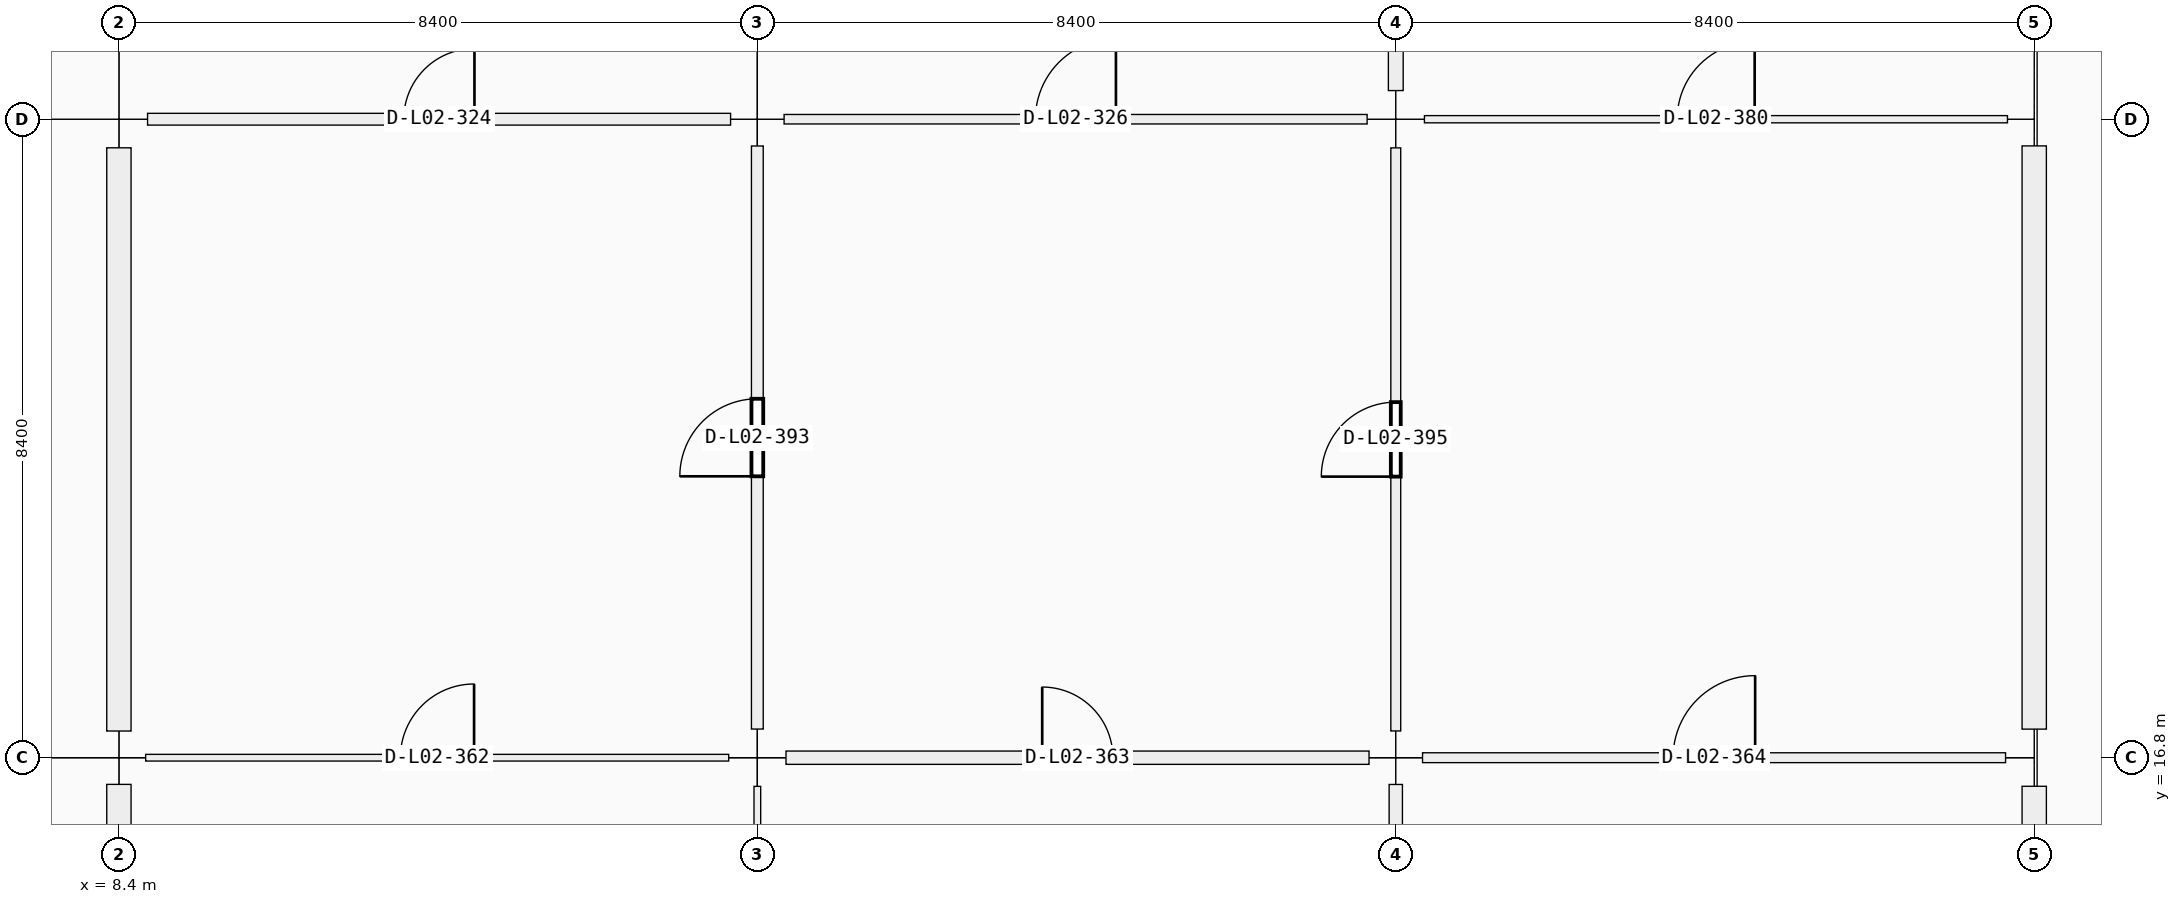
"""IFC4 building model, lengths in metres.
Left out: names, types, materials, properties, quantities, classifications, styles, units other than length and angle.
Written with IfcOpenShell. Run it as: python <this file> out.ifc"""

import sys

from ifc_helpers import new_model, si_unit, direction, frame, frame_2d, origin, origin_2d, place, context, subcontext, project, spatial, rectangle, extrude, element, fill, save


model = new_model("IFC4")
c1 = context("Model", 3, precision=1e-05, world=origin(), true_north=direction((0.0, 1.0)))
c2 = subcontext(c1, "Body", "Model", "MODEL_VIEW")
j1 = project(units=[si_unit("LENGTHUNIT", "METRE"), si_unit("PLANEANGLEUNIT", "RADIAN")], contexts=[c1])
p1 = place(None, origin())
s1 = spatial("IfcSite", under=j1, at=p1, CompositionType="ELEMENT")
p2 = place(p1, origin())
s2 = spatial("IfcBuilding", under=s1, at=p2, CompositionType="ELEMENT")
p3 = place(p2, frame((0.0, 0.0, 10.26)))
s3 = spatial("IfcBuildingStorey", under=s2, at=p3, CompositionType="ELEMENT", Elevation=10.26)
p4 = place(p3, frame((8.4, 16.8, 0.0), z_axis=(0.0, 0.0, 1.0), x_axis=(1.0, 0.0, 0.0)))
e1 = element("IfcColumn", 1, at=p4, inside=s3, PredefinedType="COLUMN", context=c2, shape_type="SweptSolid", body=[
    extrude(rectangle(XDim=0.7, YDim=0.7, at=origin_2d()), origin(), (0.0, 0.0, 1.0), 4.5),
])
for number, where, z_axis, x_axis in (
    (2, (8.4, 25.2, 0.0), (0.0, 0.0, 1.0), (1.0, 0.0, 0.0)),
    (3, (16.8, 16.8, 0.0), (0.0, 0.0, 1.0), (1.0, 0.0, 0.0)),
):
    element("IfcColumn", number, at=place(p3, frame(where, z_axis=z_axis, x_axis=x_axis)), inside=s3, PredefinedType="COLUMN", context=c2, shape_type="SweptSolid", body=[
        extrude(rectangle(XDim=0.75, YDim=0.75, at=origin_2d()), origin(), (0.0, 0.0, 1.0), 4.5),
    ])
for number, where, z_axis, x_axis in (
    (4, (16.8, 25.2, 0.0), (0.0, 0.0, 1.0), (1.0, 0.0, 0.0)),
    (5, (25.2, 16.8, 0.0), (0.0, 0.0, 1.0), (1.0, 0.0, 0.0)),
):
    element("IfcColumn", number, at=place(p3, frame(where, z_axis=z_axis, x_axis=x_axis)), inside=s3, PredefinedType="COLUMN", context=c2, shape_type="SweptSolid", body=[
        extrude(rectangle(XDim=0.7, YDim=0.7, at=origin_2d()), origin(), (0.0, 0.0, 1.0), 4.5),
    ])
for number, where, z_axis, x_axis in (
    (6, (25.2, 25.2, 0.0), (0.0, 0.0, 1.0), (1.0, 0.0, 0.0)),
    (7, (33.6, 16.8, 0.0), (0.0, 0.0, 1.0), (1.0, 0.0, 0.0)),
):
    element("IfcColumn", number, at=place(p3, frame(where, z_axis=z_axis, x_axis=x_axis)), inside=s3, PredefinedType="COLUMN", context=c2, shape_type="SweptSolid", body=[
        extrude(rectangle(XDim=0.75, YDim=0.75, at=origin_2d()), origin(), (0.0, 0.0, 1.0), 4.5),
    ])
p5 = place(p3, frame((33.6, 25.2, 0.0), z_axis=(0.0, 0.0, 1.0), x_axis=(1.0, 0.0, 0.0)))
e8 = element("IfcColumn", 8, at=p5, inside=s3, PredefinedType="COLUMN", context=c2, shape_type="SweptSolid", body=[
    extrude(rectangle(XDim=0.7, YDim=0.7, at=origin_2d()), origin(), (0.0, 0.0, 1.0), 4.5),
])
p6 = place(p3, frame((8.4, 8.676, 0.0), z_axis=(0.0, 0.0, 1.0), x_axis=(0.0, 1.0, 0.0)))
e9 = element("IfcWall", 9, at=p6, inside=s3, PredefinedType="SOLIDWALL", context=c2, shape_type="SweptSolid", body=[
    extrude(rectangle(XDim=7.773, YDim=0.32, at=frame_2d((3.886, 0.0))), origin(), (0.0, 0.0, 1.0), 3.54),
])
p7 = place(p6, frame((2.861, 0.0, 0.9)))
e10 = element("IfcOpeningElement", 10, at=p7, cuts=e9, PredefinedType="OPENING", context=c2, shape_type="SweptSolid", body=[
    extrude(rectangle(XDim=2.05, YDim=1.45, at=frame_2d((1.025, 0.725))), frame((0.0, 0.16, 0.0), z_axis=(0.0, -1.0, 0.0), x_axis=(1.0, 0.0, 0.0)), (0.0, 0.0, 1.0), 0.32),
])
p8 = place(p3, frame((8.4, 17.151, 0.0), z_axis=(0.0, 0.0, 1.0), x_axis=(0.0, 1.0, 0.0)))
e11 = element("IfcWall", 11, at=p8, inside=s3, PredefinedType="SOLIDWALL", context=c2, shape_type="SweptSolid", body=[
    extrude(rectangle(XDim=7.673, YDim=0.32, at=frame_2d((3.836, 0.0))), origin(), (0.0, 0.0, 1.0), 3.54),
])
p9 = place(p8, frame((2.611, 0.0, 0.9)))
e12 = element("IfcOpeningElement", 12, at=p9, cuts=e11, PredefinedType="OPENING", context=c2, shape_type="SweptSolid", body=[
    extrude(rectangle(XDim=2.45, YDim=1.45, at=frame_2d((1.225, 0.725))), frame((0.0, 0.16, 0.0), z_axis=(0.0, -1.0, 0.0), x_axis=(1.0, 0.0, 0.0)), (0.0, 0.0, 1.0), 0.32),
])
p10 = place(p3, frame((33.6, 16.424, 0.0), z_axis=(0.0, 0.0, 1.0), x_axis=(0.0, -1.0, 0.0)))
e13 = element("IfcWall", 13, at=p10, inside=s3, PredefinedType="SOLIDWALL", context=c2, shape_type="SweptSolid", body=[
    extrude(rectangle(XDim=7.748, YDim=0.32, at=frame_2d((3.874, 0.0))), origin(), (0.0, 0.0, 1.0), 3.54),
])
p11 = place(p10, frame((3.074, 0.0, 0.9)))
e14 = element("IfcOpeningElement", 14, at=p11, cuts=e13, PredefinedType="OPENING", context=c2, shape_type="SweptSolid", body=[
    extrude(rectangle(XDim=1.6, YDim=2.1, at=frame_2d((0.8, 1.05))), frame((0.0, 0.16, 0.0), z_axis=(0.0, -1.0, 0.0), x_axis=(1.0, 0.0, 0.0)), (0.0, 0.0, 1.0), 0.32),
])
p12 = place(p3, frame((33.6, 24.849, 0.0), z_axis=(0.0, 0.0, 1.0), x_axis=(0.0, -1.0, 0.0)))
e15 = element("IfcWall", 15, at=p12, inside=s3, PredefinedType="SOLIDWALL", context=c2, shape_type="SweptSolid", body=[
    extrude(rectangle(XDim=7.673, YDim=0.32, at=frame_2d((3.836, 0.0))), origin(), (0.0, 0.0, 1.0), 3.54),
])
p13 = place(p12, frame((2.837, 0.0, 0.9)))
e16 = element("IfcOpeningElement", 16, at=p13, cuts=e15, PredefinedType="OPENING", context=c2, shape_type="SweptSolid", body=[
    extrude(rectangle(XDim=2.0, YDim=2.1, at=frame_2d((1.0, 1.05))), frame((0.0, 0.16, 0.0), z_axis=(0.0, -1.0, 0.0), x_axis=(1.0, 0.0, 0.0)), (0.0, 0.0, 1.0), 0.32),
])
p14 = place(p3, frame((8.752, 16.8, 0.0), z_axis=(0.0, 0.0, 1.0), x_axis=(1.0, 0.0, 0.0)))
e17 = element("IfcWall", 17, at=p14, inside=s3, PredefinedType="PARTITIONING", context=c2, shape_type="SweptSolid", body=[
    extrude(rectangle(XDim=7.671, YDim=0.088, at=frame_2d((3.835, 0.0))), origin(), (0.0, 0.0, 1.0), 3.37),
])
p15 = place(p14, frame((3.351, 0.0, 0.0)))
e18 = element("IfcOpeningElement", 18, at=p15, cuts=e17, PredefinedType="OPENING", context=c2, shape_type="SweptSolid", body=[
    extrude(rectangle(XDim=0.97, YDim=2.12, at=frame_2d((0.485, 1.06))), frame((0.0, 0.044, 0.0), z_axis=(0.0, -1.0, 0.0), x_axis=(1.0, 0.0, 0.0)), (0.0, 0.0, 1.0), 0.088),
])
p16 = place(p3, frame((8.777, 25.2, 0.0), z_axis=(0.0, 0.0, 1.0), x_axis=(1.0, 0.0, 0.0)))
e19 = element("IfcWall", 19, at=p16, inside=s3, PredefinedType="PARTITIONING", context=c2, shape_type="SweptSolid", body=[
    extrude(rectangle(XDim=7.671, YDim=0.155, at=frame_2d((3.835, 0.0))), origin(), (0.0, 0.0, 1.0), 3.37),
])
p17 = place(p16, frame((3.371, 0.0, 0.0)))
e20 = element("IfcOpeningElement", 20, at=p17, cuts=e19, PredefinedType="OPENING", context=c2, shape_type="SweptSolid", body=[
    extrude(rectangle(XDim=0.93, YDim=2.12, at=frame_2d((0.465, 1.06))), frame((0.0, 0.078, 0.0), z_axis=(0.0, -1.0, 0.0), x_axis=(1.0, 0.0, 0.0)), (0.0, 0.0, 1.0), 0.155),
])
p18 = place(p3, frame((17.177, 16.8, 0.0), z_axis=(0.0, 0.0, 1.0), x_axis=(1.0, 0.0, 0.0)))
e21 = element("IfcWall", 21, at=p18, inside=s3, PredefinedType="PARTITIONING", context=c2, shape_type="SweptSolid", body=[
    extrude(rectangle(XDim=7.671, YDim=0.175, at=frame_2d((3.835, 0.0))), origin(), (0.0, 0.0, 1.0), 3.37),
])
p19 = place(p18, frame((3.371, 0.0, 0.0)))
e22 = element("IfcOpeningElement", 22, at=p19, cuts=e21, PredefinedType="OPENING", context=c2, shape_type="SweptSolid", body=[
    extrude(rectangle(XDim=0.93, YDim=2.12, at=frame_2d((0.465, 1.06))), frame((0.0, 0.087, 0.0), z_axis=(0.0, -1.0, 0.0), x_axis=(1.0, 0.0, 0.0)), (0.0, 0.0, 1.0), 0.175),
])
p20 = place(p3, frame((17.152, 25.2, 0.0), z_axis=(0.0, 0.0, 1.0), x_axis=(1.0, 0.0, 0.0)))
e23 = element("IfcWall", 23, at=p20, inside=s3, PredefinedType="PARTITIONING", context=c2, shape_type="SweptSolid", body=[
    extrude(rectangle(XDim=7.671, YDim=0.125, at=frame_2d((3.835, 0.0))), origin(), (0.0, 0.0, 1.0), 3.37),
])
p21 = place(p20, frame((3.306, 0.0, 0.0)))
e24 = element("IfcOpeningElement", 24, at=p21, cuts=e23, PredefinedType="OPENING", context=c2, shape_type="SweptSolid", body=[
    extrude(rectangle(XDim=1.06, YDim=2.25, at=frame_2d((0.53, 1.125))), frame((0.0, 0.062, 0.0), z_axis=(0.0, -1.0, 0.0), x_axis=(1.0, 0.0, 0.0)), (0.0, 0.0, 1.0), 0.125),
])
p22 = place(p3, frame((25.552, 16.8, 0.0), z_axis=(0.0, 0.0, 1.0), x_axis=(1.0, 0.0, 0.0)))
e25 = element("IfcWall", 25, at=p22, inside=s3, PredefinedType="MOVABLE", context=c2, shape_type="SweptSolid", body=[
    extrude(rectangle(XDim=7.671, YDim=0.13, at=frame_2d((3.835, 0.0))), origin(), (0.0, 0.0, 1.0), 3.37),
])
p23 = place(p22, frame((3.296, 0.0, 0.0)))
e26 = element("IfcOpeningElement", 26, at=p23, cuts=e25, PredefinedType="OPENING", context=c2, shape_type="SweptSolid", body=[
    extrude(rectangle(XDim=1.08, YDim=2.25, at=frame_2d((0.54, 1.125))), frame((0.0, 0.065, 0.0), z_axis=(0.0, -1.0, 0.0), x_axis=(1.0, 0.0, 0.0)), (0.0, 0.0, 1.0), 0.13),
])
p24 = place(p3, frame((25.577, 25.2, 0.0), z_axis=(0.0, 0.0, 1.0), x_axis=(1.0, 0.0, 0.0)))
e27 = element("IfcWall", 27, at=p24, inside=s3, PredefinedType="PARTITIONING", context=c2, shape_type="SweptSolid", body=[
    extrude(rectangle(XDim=7.671, YDim=0.095, at=frame_2d((3.835, 0.0))), origin(), (0.0, 0.0, 1.0), 3.37),
])
p25 = place(p24, frame((3.325, 0.0, 0.0)))
e28 = element("IfcOpeningElement", 28, at=p25, cuts=e27, PredefinedType="OPENING", context=c2, shape_type="SweptSolid", body=[
    extrude(rectangle(XDim=1.02, YDim=2.2, at=frame_2d((0.51, 1.1))), frame((0.0, 0.047, 0.0), z_axis=(0.0, -1.0, 0.0), x_axis=(1.0, 0.0, 0.0)), (0.0, 0.0, 1.0), 0.095),
])
p26 = place(p3, frame((16.8, 8.677, 0.0), z_axis=(0.0, 0.0, 1.0), x_axis=(0.0, 1.0, 0.0)))
e29 = element("IfcWall", 29, at=p26, inside=s3, PredefinedType="PARTITIONING", context=c2, shape_type="SweptSolid", body=[
    extrude(rectangle(XDim=7.746, YDim=0.088, at=frame_2d((3.873, 0.0))), origin(), (0.0, 0.0, 1.0), 3.37),
])
p27 = place(p26, frame((3.353, 0.0, 0.0)))
e30 = element("IfcOpeningElement", 30, at=p27, cuts=e29, PredefinedType="OPENING", context=c2, shape_type="SweptSolid", body=[
    extrude(rectangle(XDim=1.04, YDim=2.2, at=frame_2d((0.52, 1.1))), frame((0.0, 0.044, 0.0), z_axis=(0.0, -1.0, 0.0), x_axis=(1.0, 0.0, 0.0)), (0.0, 0.0, 1.0), 0.088),
])
p28 = place(p3, frame((16.8, 17.177, 0.0), z_axis=(0.0, 0.0, 1.0), x_axis=(0.0, 1.0, 0.0)))
e31 = element("IfcWall", 31, at=p28, inside=s3, PredefinedType="PARTITIONING", context=c2, shape_type="SweptSolid", body=[
    extrude(rectangle(XDim=7.671, YDim=0.155, at=frame_2d((3.835, 0.0))), origin(), (0.0, 0.0, 1.0), 3.37),
])
p29 = place(p28, frame((3.325, 0.0, 0.0)))
e32 = element("IfcOpeningElement", 32, at=p29, cuts=e31, PredefinedType="OPENING", context=c2, shape_type="SweptSolid", body=[
    extrude(rectangle(XDim=1.02, YDim=2.2, at=frame_2d((0.51, 1.1))), frame((0.0, 0.078, 0.0), z_axis=(0.0, -1.0, 0.0), x_axis=(1.0, 0.0, 0.0)), (0.0, 0.0, 1.0), 0.155),
])
p30 = place(p3, frame((25.2, 8.677, 0.0), z_axis=(0.0, 0.0, 1.0), x_axis=(0.0, 1.0, 0.0)))
e33 = element("IfcWall", 33, at=p30, inside=s3, PredefinedType="PARTITIONING", context=c2, shape_type="SweptSolid", body=[
    extrude(rectangle(XDim=7.771, YDim=0.175, at=frame_2d((3.885, 0.0))), origin(), (0.0, 0.0, 1.0), 3.37),
])
p31 = place(p30, frame((3.385, 0.0, 0.0)))
e34 = element("IfcOpeningElement", 34, at=p31, cuts=e33, PredefinedType="OPENING", context=c2, shape_type="SweptSolid", body=[
    extrude(rectangle(XDim=1.0, YDim=2.2, at=frame_2d((0.5, 1.1))), frame((0.0, 0.087, 0.0), z_axis=(0.0, -1.0, 0.0), x_axis=(1.0, 0.0, 0.0)), (0.0, 0.0, 1.0), 0.175),
])
p32 = place(p3, frame((25.2, 17.152, 0.0), z_axis=(0.0, 0.0, 1.0), x_axis=(0.0, 1.0, 0.0)))
e35 = element("IfcWall", 35, at=p32, inside=s3, PredefinedType="MOVABLE", context=c2, shape_type="SweptSolid", body=[
    extrude(rectangle(XDim=7.671, YDim=0.13, at=frame_2d((3.835, 0.0))), origin(), (0.0, 0.0, 1.0), 3.37),
])
p33 = place(p32, frame((3.346, 0.0, 0.0)))
e36 = element("IfcOpeningElement", 36, at=p33, cuts=e35, PredefinedType="OPENING", context=c2, shape_type="SweptSolid", body=[
    extrude(rectangle(XDim=0.98, YDim=2.18, at=frame_2d((0.49, 1.09))), frame((0.0, 0.065, 0.0), z_axis=(0.0, -1.0, 0.0), x_axis=(1.0, 0.0, 0.0)), (0.0, 0.0, 1.0), 0.13),
])
p34 = place(p3, frame((25.2, 25.577, 0.0), z_axis=(0.0, 0.0, 1.0), x_axis=(0.0, 1.0, 0.0)))
e37 = element("IfcWall", 37, at=p34, inside=s3, PredefinedType="PARTITIONING", context=c2, shape_type="SweptSolid", body=[
    extrude(rectangle(XDim=7.671, YDim=0.195, at=frame_2d((3.835, 0.0))), origin(), (0.0, 0.0, 1.0), 3.37),
])
p35 = place(p34, frame((3.371, 0.0, 0.0)))
e38 = element("IfcOpeningElement", 38, at=p35, cuts=e37, PredefinedType="OPENING", context=c2, shape_type="SweptSolid", body=[
    extrude(rectangle(XDim=0.93, YDim=2.12, at=frame_2d((0.465, 1.06))), frame((0.0, 0.098, 0.0), z_axis=(0.0, -1.0, 0.0), x_axis=(1.0, 0.0, 0.0)), (0.0, 0.0, 1.0), 0.195),
])
p36 = place(p9, origin())
e39 = element("IfcWindow", 39, at=p36, inside=s3, PartitioningType="SINGLE_PANEL", PredefinedType="WINDOW", context=c2, shape_type="SweptSolid", body=[
    extrude(rectangle(XDim=2.45, YDim=1.45, at=frame_2d((1.225, 0.725))), frame((0.0, 0.03, 0.0), z_axis=(0.0, -1.0, 0.0), x_axis=(1.0, 0.0, 0.0)), (0.0, 0.0, 1.0), 0.06),
])
fill(e12, e39)
p37 = place(p13, origin())
e40 = element("IfcWindow", 40, at=p37, inside=s3, PartitioningType="SINGLE_PANEL", PredefinedType="WINDOW", context=c2, shape_type="SweptSolid", body=[
    extrude(rectangle(XDim=2.0, YDim=2.1, at=frame_2d((1.0, 1.05))), frame((0.0, 0.03, 0.0), z_axis=(0.0, -1.0, 0.0), x_axis=(1.0, 0.0, 0.0)), (0.0, 0.0, 1.0), 0.06),
])
fill(e16, e40)
p38 = place(p17, origin())
e41 = element("IfcDoor", 41, at=p38, inside=s3, OperationType="SINGLE_SWING_RIGHT", PredefinedType="DOOR", context=c2, shape_type="SweptSolid", body=[
    extrude(rectangle(XDim=0.93, YDim=2.12, at=frame_2d((0.465, 1.06))), frame((0.0, 0.025, 0.0), z_axis=(0.0, -1.0, 0.0), x_axis=(1.0, 0.0, 0.0)), (0.0, 0.0, 1.0), 0.05),
])
fill(e20, e41)
p39 = place(p21, origin())
e42 = element("IfcDoor", 42, at=p39, inside=s3, OperationType="SINGLE_SWING_RIGHT", PredefinedType="DOOR", context=c2, shape_type="SweptSolid", body=[
    extrude(rectangle(XDim=1.06, YDim=2.25, at=frame_2d((0.53, 1.125))), frame((0.0, 0.025, 0.0), z_axis=(0.0, -1.0, 0.0), x_axis=(1.0, 0.0, 0.0)), (0.0, 0.0, 1.0), 0.05),
])
fill(e24, e42)
p40 = place(p15, origin())
e43 = element("IfcDoor", 43, at=p40, inside=s3, OperationType="SINGLE_SWING_RIGHT", PredefinedType="DOOR", context=c2, shape_type="SweptSolid", body=[
    extrude(rectangle(XDim=0.97, YDim=2.12, at=frame_2d((0.485, 1.06))), frame((0.0, 0.025, 0.0), z_axis=(0.0, -1.0, 0.0), x_axis=(1.0, 0.0, 0.0)), (0.0, 0.0, 1.0), 0.05),
])
fill(e18, e43)
p41 = place(p19, origin())
e44 = element("IfcDoor", 44, at=p41, inside=s3, OperationType="SINGLE_SWING_LEFT", PredefinedType="DOOR", context=c2, shape_type="SweptSolid", body=[
    extrude(rectangle(XDim=0.93, YDim=2.12, at=frame_2d((0.465, 1.06))), frame((0.0, 0.025, 0.0), z_axis=(0.0, -1.0, 0.0), x_axis=(1.0, 0.0, 0.0)), (0.0, 0.0, 1.0), 0.05),
])
fill(e22, e44)
p42 = place(p23, origin())
e45 = element("IfcDoor", 45, at=p42, inside=s3, OperationType="SINGLE_SWING_RIGHT", PredefinedType="DOOR", context=c2, shape_type="SweptSolid", body=[
    extrude(rectangle(XDim=1.08, YDim=2.25, at=frame_2d((0.54, 1.125))), frame((0.0, 0.025, 0.0), z_axis=(0.0, -1.0, 0.0), x_axis=(1.0, 0.0, 0.0)), (0.0, 0.0, 1.0), 0.05),
])
fill(e26, e45)
p43 = place(p25, origin())
e46 = element("IfcDoor", 46, at=p43, inside=s3, OperationType="SINGLE_SWING_RIGHT", PredefinedType="DOOR", context=c2, shape_type="SweptSolid", body=[
    extrude(rectangle(XDim=1.02, YDim=2.2, at=frame_2d((0.51, 1.1))), frame((0.0, 0.025, 0.0), z_axis=(0.0, -1.0, 0.0), x_axis=(1.0, 0.0, 0.0)), (0.0, 0.0, 1.0), 0.05),
])
fill(e28, e46)
p44 = place(p29, origin())
e47 = element("IfcDoor", 47, at=p44, inside=s3, OperationType="SINGLE_SWING_LEFT", PredefinedType="DOOR", context=c2, shape_type="SweptSolid", body=[
    extrude(rectangle(XDim=1.02, YDim=2.2, at=frame_2d((0.51, 1.1))), frame((0.0, 0.025, 0.0), z_axis=(0.0, -1.0, 0.0), x_axis=(1.0, 0.0, 0.0)), (0.0, 0.0, 1.0), 0.05),
])
fill(e32, e47)
p45 = place(p33, origin())
e48 = element("IfcDoor", 48, at=p45, inside=s3, OperationType="SINGLE_SWING_LEFT", PredefinedType="DOOR", context=c2, shape_type="SweptSolid", body=[
    extrude(rectangle(XDim=0.98, YDim=2.18, at=frame_2d((0.49, 1.09))), frame((0.0, 0.025, 0.0), z_axis=(0.0, -1.0, 0.0), x_axis=(1.0, 0.0, 0.0)), (0.0, 0.0, 1.0), 0.05),
])
fill(e36, e48)
save(model, sys.argv[1])
